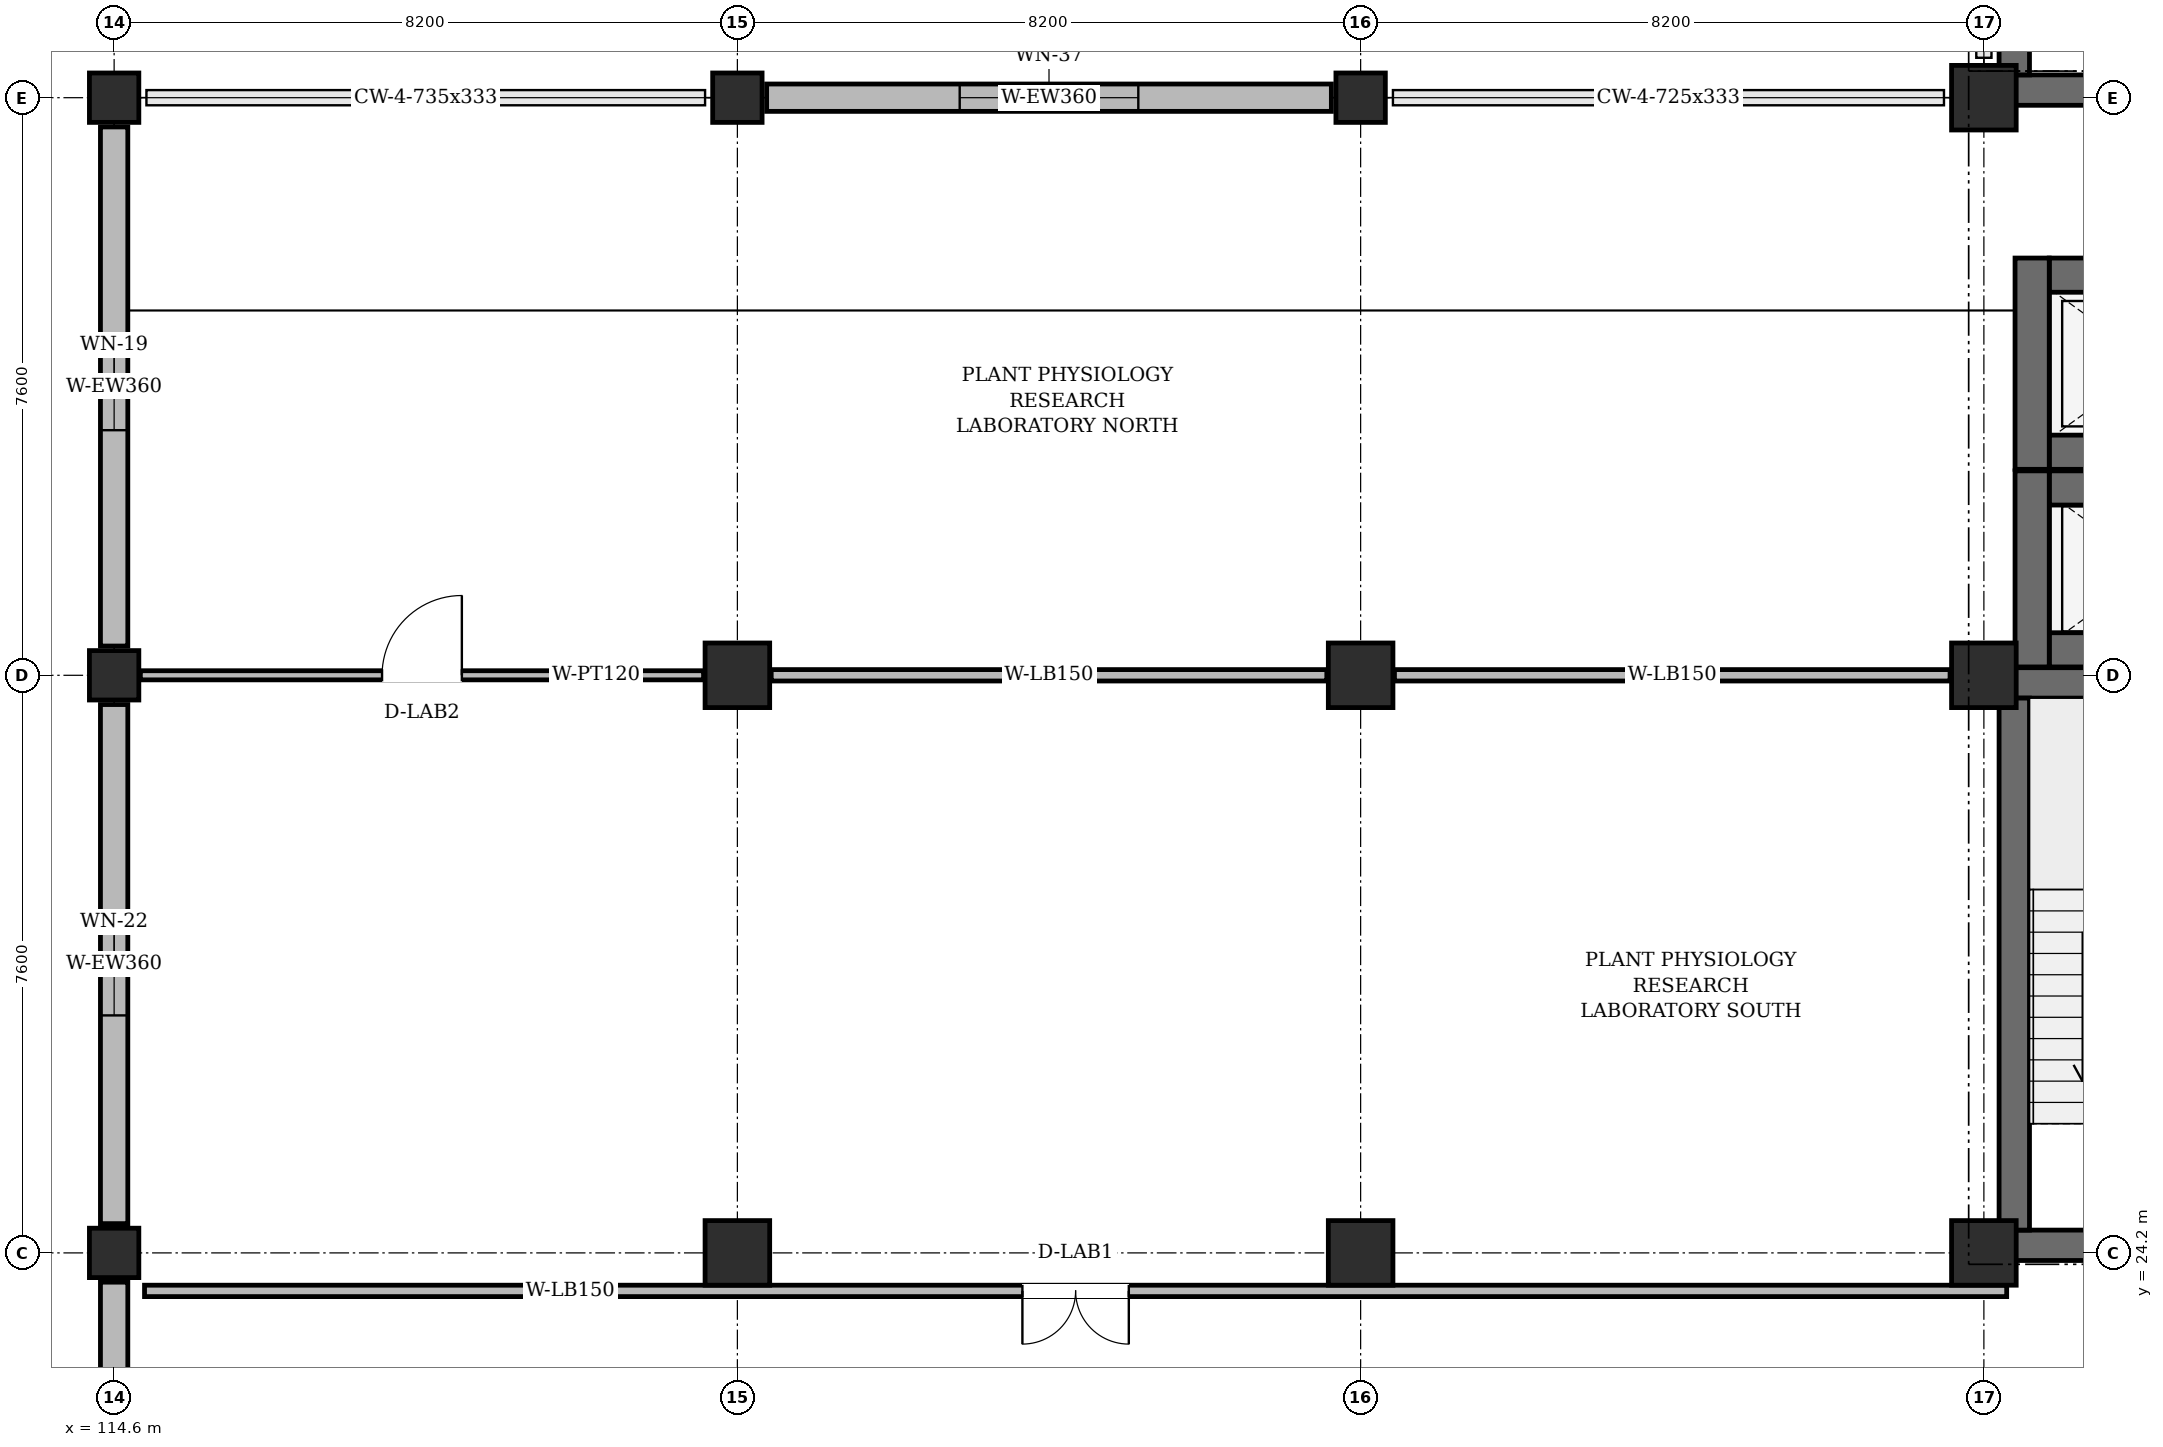
"""IFC4 building model, lengths in metres.
Left out: names, types, materials, properties, quantities, classifications, styles, units other than length and angle.
Written with IfcOpenShell. Run it as: python <this file> out.ifc"""

import sys

from ifc_helpers import new_model, si_unit, direction, frame, frame_2d, origin, origin_2d, place, context, subcontext, project, spatial, rectangle, extrude, element, fill, save


model = new_model("IFC4")
c1 = context("Model", 3, precision=1e-05, world=origin(), true_north=direction((0.0, 1.0)))
c2 = subcontext(c1, "Body", "Model", "MODEL_VIEW")
j1 = project(units=[si_unit("LENGTHUNIT", "METRE"), si_unit("PLANEANGLEUNIT", "RADIAN")], contexts=[c1])
p1 = place(None, origin())
s1 = spatial("IfcSite", under=j1, at=p1, CompositionType="ELEMENT")
p2 = place(p1, origin())
s2 = spatial("IfcBuilding", under=s1, at=p2, CompositionType="ELEMENT")
p3 = place(p2, frame((0.0, 0.0, 24.0)))
s3 = spatial("IfcBuildingStorey", under=s2, at=p3, CompositionType="ELEMENT", Elevation=24.0)
for number, where, z_axis, x_axis in (
    (1, (114.6, 24.2, 0.0), (0.0, 0.0, 1.0), (1.0, 0.0, 0.0)),
    (2, (114.6, 31.8, 0.0), (0.0, 0.0, 1.0), (1.0, 0.0, 0.0)),
    (3, (114.6, 39.4, 0.0), (0.0, 0.0, 1.0), (1.0, 0.0, 0.0)),
):
    element("IfcColumn", number, at=place(p3, frame(where, z_axis=z_axis, x_axis=x_axis)), inside=s3, PredefinedType="COLUMN", context=c2, shape_type="SweptSolid", body=[
        extrude(rectangle(XDim=0.65, YDim=0.65, at=origin_2d()), origin(), (0.0, 0.0, 1.0), 3.93),
    ])
for number, where, z_axis, x_axis in (
    (4, (122.8, 24.2, 0.0), (0.0, 0.0, 1.0), (1.0, 0.0, 0.0)),
    (5, (122.8, 31.8, 0.0), (0.0, 0.0, 1.0), (1.0, 0.0, 0.0)),
):
    element("IfcColumn", number, at=place(p3, frame(where, z_axis=z_axis, x_axis=x_axis)), inside=s3, PredefinedType="COLUMN", context=c2, shape_type="SweptSolid", body=[
        extrude(rectangle(XDim=0.85, YDim=0.85, at=origin_2d()), origin(), (0.0, 0.0, 1.0), 3.93),
    ])
p4 = place(p3, frame((122.8, 39.4, 0.0), z_axis=(0.0, 0.0, 1.0), x_axis=(1.0, 0.0, 0.0)))
e6 = element("IfcColumn", 6, at=p4, inside=s3, PredefinedType="COLUMN", context=c2, shape_type="SweptSolid", body=[
    extrude(rectangle(XDim=0.65, YDim=0.65, at=origin_2d()), origin(), (0.0, 0.0, 1.0), 3.93),
])
for number, where, z_axis, x_axis in (
    (7, (131.0, 24.2, 0.0), (0.0, 0.0, 1.0), (1.0, 0.0, 0.0)),
    (8, (131.0, 31.8, 0.0), (0.0, 0.0, 1.0), (1.0, 0.0, 0.0)),
):
    element("IfcColumn", number, at=place(p3, frame(where, z_axis=z_axis, x_axis=x_axis)), inside=s3, PredefinedType="COLUMN", context=c2, shape_type="SweptSolid", body=[
        extrude(rectangle(XDim=0.85, YDim=0.85, at=origin_2d()), origin(), (0.0, 0.0, 1.0), 3.93),
    ])
p5 = place(p3, frame((131.0, 39.4, 0.0), z_axis=(0.0, 0.0, 1.0), x_axis=(1.0, 0.0, 0.0)))
e9 = element("IfcColumn", 9, at=p5, inside=s3, PredefinedType="COLUMN", context=c2, shape_type="SweptSolid", body=[
    extrude(rectangle(XDim=0.65, YDim=0.65, at=origin_2d()), origin(), (0.0, 0.0, 1.0), 3.93),
])
for number, where, z_axis, x_axis in (
    (10, (139.2, 24.2, 0.0), (0.0, 0.0, 1.0), (1.0, 0.0, 0.0)),
    (11, (139.2, 31.8, 0.0), (0.0, 0.0, 1.0), (1.0, 0.0, 0.0)),
    (12, (139.2, 39.4, 0.0), (0.0, 0.0, 1.0), (1.0, 0.0, 0.0)),
):
    element("IfcColumn", number, at=place(p3, frame(where, z_axis=z_axis, x_axis=x_axis)), inside=s3, PredefinedType="COLUMN", context=c2, shape_type="SweptSolid", body=[
        extrude(rectangle(XDim=0.85, YDim=0.85, at=origin_2d()), origin(), (0.0, 0.0, 1.0), 3.93),
    ])
p6 = place(p3, frame((130.615, 39.4, 0.0), z_axis=(0.0, 0.0, 1.0), x_axis=(-1.0, 0.0, 0.0)))
e13 = element("IfcWall", 13, at=p6, inside=s3, PredefinedType="SOLIDWALL", context=c2, shape_type="SweptSolid", body=[
    extrude(rectangle(XDim=7.43, YDim=0.36, at=frame_2d((3.715, 0.0))), origin(), (0.0, 0.0, 1.0), 3.315),
])
p7 = place(p6, frame((2.54, 0.0, 0.95)))
e14 = element("IfcOpeningElement", 14, at=p7, cuts=e13, PredefinedType="OPENING", context=c2, shape_type="SweptSolid", body=[
    extrude(rectangle(XDim=2.35, YDim=1.25, at=frame_2d((1.175, 0.625))), frame((0.0, 0.192, 0.0), z_axis=(0.0, -1.0, 0.0), x_axis=(1.0, 0.0, 0.0)), (0.0, 0.0, 1.0), 0.384),
])
p8 = place(p3, frame((114.6, 39.015, 0.0), z_axis=(0.0, 0.0, 1.0), x_axis=(0.0, -1.0, 0.0)))
e15 = element("IfcWall", 15, at=p8, inside=s3, PredefinedType="SOLIDWALL", context=c2, shape_type="SweptSolid", body=[
    extrude(rectangle(XDim=6.83, YDim=0.36, at=frame_2d((3.415, 0.0))), origin(), (0.0, 0.0, 1.0), 3.315),
])
p9 = place(p8, frame((2.84, 0.0, 0.95)))
e16 = element("IfcOpeningElement", 16, at=p9, cuts=e15, PredefinedType="OPENING", context=c2, shape_type="SweptSolid", body=[
    extrude(rectangle(XDim=1.15, YDim=1.75, at=frame_2d((0.575, 0.875))), frame((0.0, 0.192, 0.0), z_axis=(0.0, -1.0, 0.0), x_axis=(1.0, 0.0, 0.0)), (0.0, 0.0, 1.0), 0.384),
])
p10 = place(p3, frame((114.6, 31.415, 0.0), z_axis=(0.0, 0.0, 1.0), x_axis=(0.0, -1.0, 0.0)))
e17 = element("IfcWall", 17, at=p10, inside=s3, PredefinedType="SOLIDWALL", context=c2, shape_type="SweptSolid", body=[
    extrude(rectangle(XDim=6.83, YDim=0.36, at=frame_2d((3.415, 0.0))), origin(), (0.0, 0.0, 1.0), 3.315),
])
p11 = place(p10, frame((2.74, 0.0, 0.95)))
e18 = element("IfcOpeningElement", 18, at=p11, cuts=e17, PredefinedType="OPENING", context=c2, shape_type="SweptSolid", body=[
    extrude(rectangle(XDim=1.35, YDim=1.5, at=frame_2d((0.675, 0.75))), frame((0.0, 0.192, 0.0), z_axis=(0.0, -1.0, 0.0), x_axis=(1.0, 0.0, 0.0)), (0.0, 0.0, 1.0), 0.384),
])
p12 = place(p3, frame((114.6, 23.815, 0.0), z_axis=(0.0, 0.0, 1.0), x_axis=(0.0, -1.0, 0.0)))
e19 = element("IfcWall", 19, at=p12, inside=s3, PredefinedType="SOLIDWALL", context=c2, shape_type="SweptSolid", body=[
    extrude(rectangle(XDim=6.83, YDim=0.36, at=frame_2d((3.415, 0.0))), origin(), (0.0, 0.0, 1.0), 3.315),
])
p13 = place(p12, frame((2.64, 0.0, 0.95)))
e20 = element("IfcOpeningElement", 20, at=p13, cuts=e19, PredefinedType="OPENING", context=c2, shape_type="SweptSolid", body=[
    extrude(rectangle(XDim=1.55, YDim=1.25, at=frame_2d((0.775, 0.625))), frame((0.0, 0.192, 0.0), z_axis=(0.0, -1.0, 0.0), x_axis=(1.0, 0.0, 0.0)), (0.0, 0.0, 1.0), 0.384),
])
p14 = place(p3, frame((139.4, 24.3, 0.0), z_axis=(0.0, 0.0, 1.0), x_axis=(1.0, 0.0, 0.0)))
e21 = element("IfcWall", 21, at=p14, inside=s3, PredefinedType="SHEAR", context=c2, shape_type="SweptSolid", body=[
    extrude(rectangle(XDim=3.8, YDim=0.4, at=frame_2d((1.9, 0.0))), origin(), (0.0, 0.0, 1.0), 3.93),
])
p15 = place(p14, frame((1.3, 0.0, 0.0)))
e22 = element("IfcOpeningElement", 22, at=p15, cuts=e21, PredefinedType="OPENING", context=c2, shape_type="SweptSolid", body=[
    extrude(rectangle(XDim=1.2, YDim=2.2, at=frame_2d((0.6, 1.1))), frame((0.0, 0.212, 0.0), z_axis=(0.0, -1.0, 0.0), x_axis=(1.0, 0.0, 0.0)), (0.0, 0.0, 1.0), 0.424),
])
p16 = place(p3, frame((139.4, 31.7, 0.0), z_axis=(0.0, 0.0, 1.0), x_axis=(1.0, 0.0, 0.0)))
e23 = element("IfcWall", 23, at=p16, inside=s3, PredefinedType="SHEAR", context=c2, shape_type="SweptSolid", body=[
    extrude(rectangle(XDim=3.8, YDim=0.4, at=frame_2d((1.9, 0.0))), origin(), (0.0, 0.0, 1.0), 3.93),
])
p17 = place(p3, frame((139.6, 24.5, 0.0), z_axis=(0.0, 0.0, 1.0), x_axis=(0.0, 1.0, 0.0)))
e24 = element("IfcWall", 24, at=p17, inside=s3, PredefinedType="SHEAR", context=c2, shape_type="SweptSolid", body=[
    extrude(rectangle(XDim=7.0, YDim=0.4, at=frame_2d((3.5, 0.0))), origin(), (0.0, 0.0, 1.0), 3.93),
])
p18 = place(p3, frame((139.4, 39.5, 0.0), z_axis=(0.0, 0.0, 1.0), x_axis=(1.0, 0.0, 0.0)))
e25 = element("IfcWall", 25, at=p18, inside=s3, PredefinedType="SHEAR", context=c2, shape_type="SweptSolid", body=[
    extrude(rectangle(XDim=3.8, YDim=0.4, at=frame_2d((1.9, 0.0))), origin(), (0.0, 0.0, 1.0), 3.93),
])
p19 = place(p18, frame((1.3, 0.0, 0.0)))
e26 = element("IfcOpeningElement", 26, at=p19, cuts=e25, PredefinedType="OPENING", context=c2, shape_type="SweptSolid", body=[
    extrude(rectangle(XDim=1.2, YDim=2.2, at=frame_2d((0.6, 1.1))), frame((0.0, 0.212, 0.0), z_axis=(0.0, -1.0, 0.0), x_axis=(1.0, 0.0, 0.0)), (0.0, 0.0, 1.0), 0.424),
])
p20 = place(p3, frame((139.6, 39.7, 0.0), z_axis=(0.0, 0.0, 1.0), x_axis=(0.0, 1.0, 0.0)))
e27 = element("IfcWall", 27, at=p20, inside=s3, PredefinedType="SHEAR", context=c2, shape_type="SweptSolid", body=[
    extrude(rectangle(XDim=7.0, YDim=0.4, at=frame_2d((3.5, 0.0))), origin(), (0.0, 0.0, 1.0), 3.93),
])
for number, where, z_axis, x_axis in (
    (28, (140.06, 32.135, 0.0), (0.0, 0.0, 1.0), (1.0, 0.0, 0.0)),
    (29, (140.06, 34.265, 0.0), (0.0, 0.0, 1.0), (1.0, 0.0, 0.0)),
):
    element("IfcWall", number, at=place(p3, frame(where, z_axis=z_axis, x_axis=x_axis)), inside=s3, PredefinedType="SHEAR", context=c2, shape_type="SweptSolid", body=[
        extrude(rectangle(XDim=2.74, YDim=0.45, at=frame_2d((1.37, 0.0))), origin(), (0.0, 0.0, 1.0), 3.93),
    ])
p21 = place(p3, frame((139.835, 31.91, 0.0), z_axis=(0.0, 0.0, 1.0), x_axis=(0.0, 1.0, 0.0)))
e30 = element("IfcWall", 30, at=p21, inside=s3, PredefinedType="SHEAR", context=c2, shape_type="SweptSolid", body=[
    extrude(rectangle(XDim=2.58, YDim=0.45, at=frame_2d((1.29, 0.0))), origin(), (0.0, 0.0, 1.0), 3.93),
])
for number, where, z_axis, x_axis in (
    (31, (140.06, 34.735, 0.0), (0.0, 0.0, 1.0), (1.0, 0.0, 0.0)),
    (32, (140.06, 37.065, 0.0), (0.0, 0.0, 1.0), (1.0, 0.0, 0.0)),
):
    element("IfcWall", number, at=place(p3, frame(where, z_axis=z_axis, x_axis=x_axis)), inside=s3, PredefinedType="SHEAR", context=c2, shape_type="SweptSolid", body=[
        extrude(rectangle(XDim=2.74, YDim=0.45, at=frame_2d((1.37, 0.0))), origin(), (0.0, 0.0, 1.0), 3.93),
    ])
p22 = place(p3, frame((139.835, 34.51, 0.0), z_axis=(0.0, 0.0, 1.0), x_axis=(0.0, 1.0, 0.0)))
e33 = element("IfcWall", 33, at=p22, inside=s3, PredefinedType="SHEAR", context=c2, shape_type="SweptSolid", body=[
    extrude(rectangle(XDim=2.78, YDim=0.45, at=frame_2d((1.39, 0.0))), origin(), (0.0, 0.0, 1.0), 3.93),
])
p23 = place(p3, frame((115.0, 23.7, 0.0), z_axis=(0.0, 0.0, 1.0), x_axis=(1.0, 0.0, 0.0)))
e34 = element("IfcWall", 34, at=p23, inside=s3, PredefinedType="PARTITIONING", context=c2, shape_type="SweptSolid", body=[
    extrude(rectangle(XDim=24.5, YDim=0.15, at=frame_2d((12.25, 0.0))), origin(), (0.0, 0.0, 1.0), 3.805),
])
p24 = place(p23, frame((11.55, 0.0, 0.0)))
e35 = element("IfcOpeningElement", 35, at=p24, cuts=e34, PredefinedType="OPENING", context=c2, shape_type="SweptSolid", body=[
    extrude(rectangle(XDim=1.4, YDim=2.2, at=frame_2d((0.7, 1.1))), frame((0.0, 0.087, 0.0), z_axis=(0.0, -1.0, 0.0), x_axis=(1.0, 0.0, 0.0)), (0.0, 0.0, 1.0), 0.174),
])
p25 = place(p3, frame((114.945, 31.8, 0.0), z_axis=(0.0, 0.0, 1.0), x_axis=(1.0, 0.0, 0.0)))
e36 = element("IfcWall", 36, at=p25, inside=s3, PredefinedType="PARTITIONING", context=c2, shape_type="SweptSolid", body=[
    extrude(rectangle(XDim=7.41, YDim=0.12, at=frame_2d((3.705, 0.0))), origin(), (0.0, 0.0, 1.0), 3.265),
])
p26 = place(p25, frame((3.18, 0.0, 0.0)))
e37 = element("IfcOpeningElement", 37, at=p26, cuts=e36, PredefinedType="OPENING", context=c2, shape_type="SweptSolid", body=[
    extrude(rectangle(XDim=1.05, YDim=2.2, at=frame_2d((0.525, 1.1))), frame((0.0, 0.072, 0.0), z_axis=(0.0, -1.0, 0.0), x_axis=(1.0, 0.0, 0.0)), (0.0, 0.0, 1.0), 0.144),
])
for number, where, z_axis, x_axis in (
    (38, (123.245, 31.8, 0.0), (0.0, 0.0, 1.0), (1.0, 0.0, 0.0)),
    (39, (131.445, 31.8, 0.0), (0.0, 0.0, 1.0), (1.0, 0.0, 0.0)),
):
    element("IfcWall", number, at=place(p3, frame(where, z_axis=z_axis, x_axis=x_axis)), inside=s3, PredefinedType="PARTITIONING", context=c2, shape_type="SweptSolid", body=[
        extrude(rectangle(XDim=7.31, YDim=0.15, at=frame_2d((3.655, 0.0))), origin(), (0.0, 0.0, 1.0), 3.265),
    ])
p27 = place(p7, origin())
e40 = element("IfcWindow", 40, at=p27, inside=s3, PartitioningType="DOUBLE_PANEL_VERTICAL", PredefinedType="WINDOW", context=c2, shape_type="SweptSolid", body=[
    extrude(rectangle(XDim=2.35, YDim=1.25, at=frame_2d((1.175, 0.625))), frame((0.0, 0.03, 0.0), z_axis=(0.0, -1.0, 0.0), x_axis=(1.0, 0.0, 0.0)), (0.0, 0.0, 1.0), 0.06),
])
fill(e14, e40)
p28 = place(p9, origin())
e41 = element("IfcWindow", 41, at=p28, inside=s3, PartitioningType="SINGLE_PANEL", PredefinedType="WINDOW", context=c2, shape_type="SweptSolid", body=[
    extrude(rectangle(XDim=1.15, YDim=1.75, at=frame_2d((0.575, 0.875))), frame((0.0, 0.03, 0.0), z_axis=(0.0, -1.0, 0.0), x_axis=(1.0, 0.0, 0.0)), (0.0, 0.0, 1.0), 0.06),
])
fill(e16, e41)
p29 = place(p11, origin())
e42 = element("IfcWindow", 42, at=p29, inside=s3, PartitioningType="SINGLE_PANEL", PredefinedType="WINDOW", context=c2, shape_type="SweptSolid", body=[
    extrude(rectangle(XDim=1.35, YDim=1.5, at=frame_2d((0.675, 0.75))), frame((0.0, 0.03, 0.0), z_axis=(0.0, -1.0, 0.0), x_axis=(1.0, 0.0, 0.0)), (0.0, 0.0, 1.0), 0.06),
])
fill(e18, e42)
p30 = place(p24, frame((1.4, 0.0, 0.0), z_axis=(0.0, 0.0, 1.0), x_axis=(-1.0, 0.0, 0.0)))
e43 = element("IfcDoor", 43, at=p30, inside=s3, OperationType="DOUBLE_DOOR_SINGLE_SWING", PredefinedType="DOOR", context=c2, shape_type="SweptSolid", body=[
    extrude(rectangle(XDim=1.4, YDim=2.2, at=frame_2d((0.7, 1.1))), frame((0.0, 0.025, 0.0), z_axis=(0.0, -1.0, 0.0), x_axis=(1.0, 0.0, 0.0)), (0.0, 0.0, 1.0), 0.05),
])
fill(e35, e43)
p31 = place(p26, origin())
e44 = element("IfcDoor", 44, at=p31, inside=s3, OperationType="SINGLE_SWING_RIGHT", PredefinedType="DOOR", context=c2, shape_type="SweptSolid", body=[
    extrude(rectangle(XDim=1.05, YDim=2.2, at=frame_2d((0.525, 1.1))), frame((0.0, 0.025, 0.0), z_axis=(0.0, -1.0, 0.0), x_axis=(1.0, 0.0, 0.0)), (0.0, 0.0, 1.0), 0.05),
])
fill(e37, e44)
save(model, sys.argv[1])
